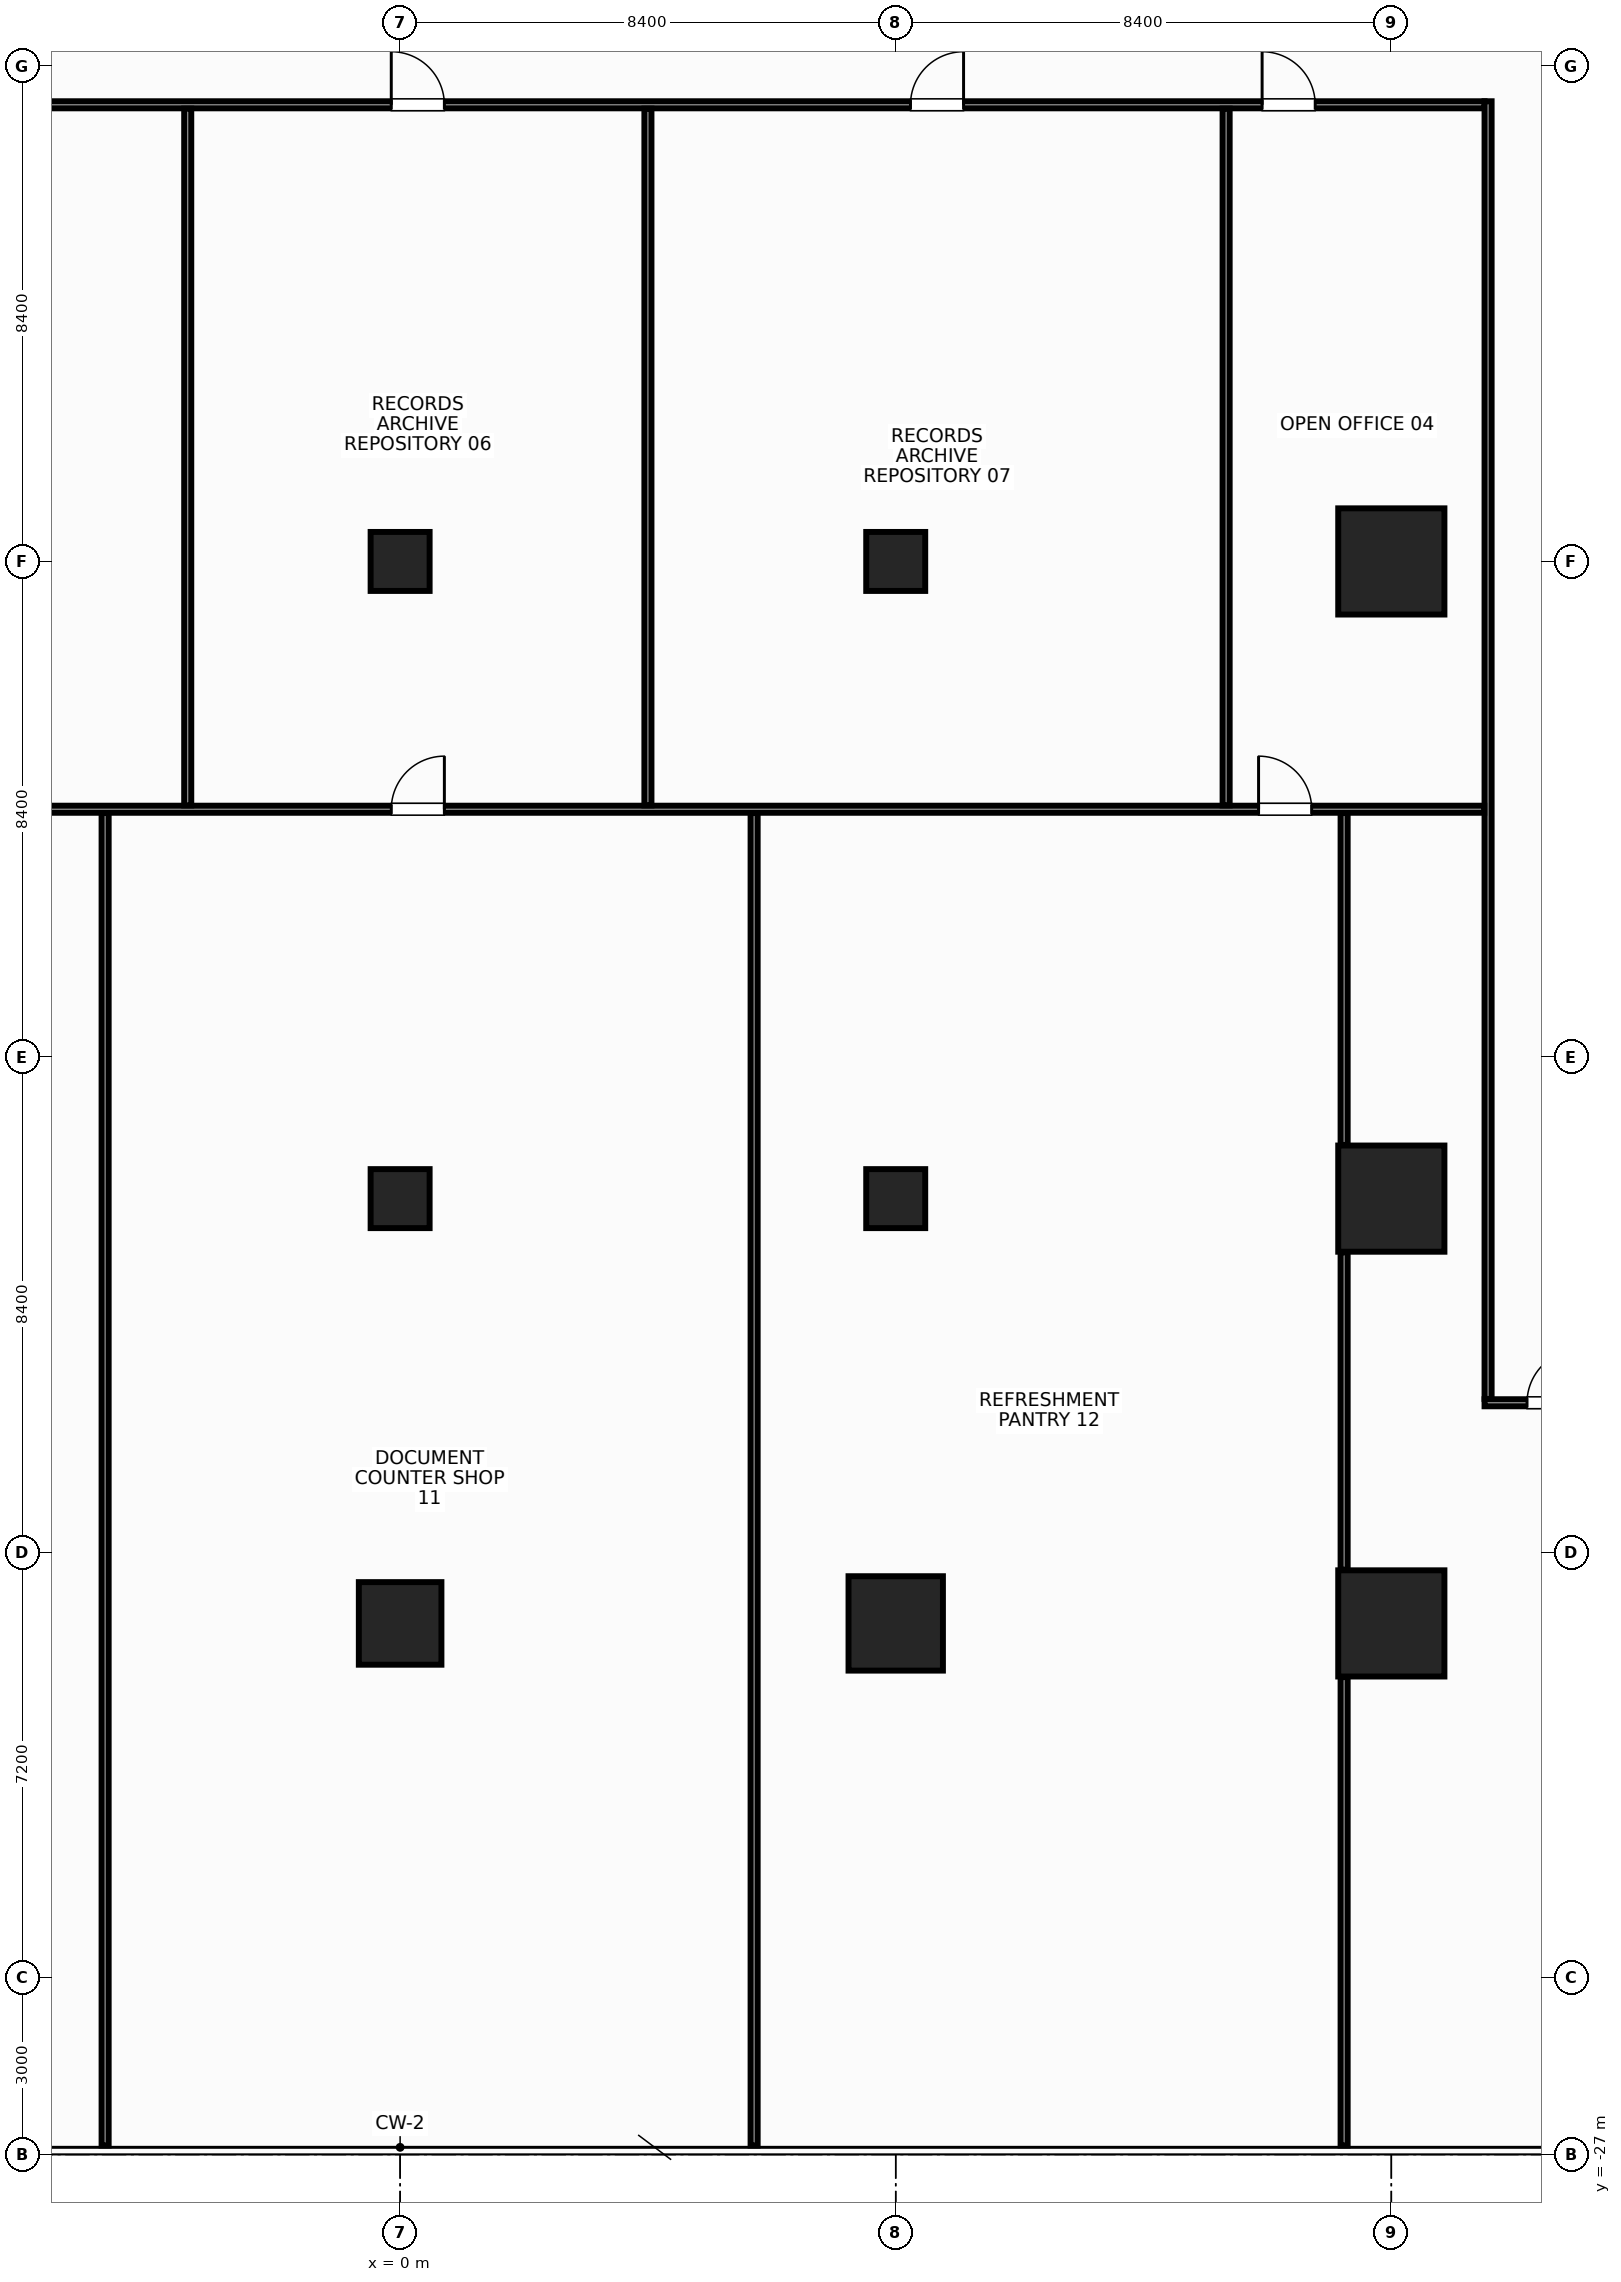
"""IFC4 building model, lengths in metres.
Left out: names, types, materials, properties, quantities, classifications, styles, units other than length and angle.
Written with IfcOpenShell. Run it as: python <this file> out.ifc"""

import sys

from ifc_helpers import new_model, si_unit, direction, frame, frame_2d, origin, origin_2d, place, context, subcontext, project, spatial, rectangle, hollow_rectangle, extrude, source, transform, mapped, element, fill, save


model = new_model("IFC4")
c1 = context("Model", 3, precision=1e-05, world=origin(), true_north=direction((0.0, 1.0)))
c2 = subcontext(c1, "Body", "Model", "MODEL_VIEW")
j1 = project(units=[si_unit("LENGTHUNIT", "METRE"), si_unit("PLANEANGLEUNIT", "RADIAN")], contexts=[c1])
p1 = place(None, origin())
s1 = spatial("IfcSite", under=j1, at=p1, CompositionType="ELEMENT")
p2 = place(p1, origin())
s2 = spatial("IfcBuilding", under=s1, at=p2, CompositionType="ELEMENT")
p3 = place(p2, frame((0.0, 0.0, 23.6)))
s3 = spatial("IfcBuildingStorey", under=s2, at=p3, CompositionType="ELEMENT", Elevation=23.6)
m1 = source(origin(), c2, "Body", "SweptSolid", [
    extrude(rectangle(XDim=1.8, YDim=1.8, at=origin_2d()), origin(), (0.0, 0.0, 1.0), 3.6),
])
for number, where, z_axis, x_axis in (
    (1, (16.8, -18.0, 0.0), (0.0, 0.0, 1.0), (1.0, 0.0, 0.0)),
    (2, (16.8, -10.8, 0.0), (0.0, 0.0, 1.0), (1.0, 0.0, 0.0)),
    (3, (16.8, 0.0, 0.0), (0.0, 0.0, 1.0), (1.0, 0.0, 0.0)),
):
    element("IfcColumn", number, at=place(p3, frame(where, z_axis=z_axis, x_axis=x_axis)), inside=s3, PredefinedType="COLUMN", context=c2, shape_type="MappedRepresentation", body=[
        mapped(m1, transform((0.0, 0.0, 0.0), x_axis=(1.0, 0.0, 0.0), y_axis=(0.0, 1.0, 0.0), z_axis=(0.0, 0.0, 1.0), scale=1.0)),
    ])
m2 = source(origin(), c2, "Body", "SweptSolid", [
    extrude(rectangle(XDim=1.6, YDim=1.6, at=origin_2d()), origin(), (0.0, 0.0, 1.0), 3.6),
])
p4 = place(p3, frame((8.4, -18.0, 0.0), z_axis=(0.0, 0.0, 1.0), x_axis=(1.0, 0.0, 0.0)))
e4 = element("IfcColumn", 4, at=p4, inside=s3, PredefinedType="COLUMN", context=c2, shape_type="MappedRepresentation", body=[
    mapped(m2, transform((0.0, 0.0, 0.0), x_axis=(1.0, 0.0, 0.0), y_axis=(0.0, 1.0, 0.0), z_axis=(0.0, 0.0, 1.0), scale=1.0)),
])
m3 = source(origin(), c2, "Body", "SweptSolid", [
    extrude(hollow_rectangle(XDim=1.0, YDim=1.0, WallThickness=0.045, at=origin_2d()), origin(), (0.0, 0.0, 1.0), 3.6),
])
for number, where, z_axis, x_axis in (
    (5, (8.4, 0.0, 0.0), (0.0, 0.0, 1.0), (1.0, 0.0, 0.0)),
    (6, (8.4, -10.8, 0.0), (0.0, 0.0, 1.0), (1.0, 0.0, 0.0)),
):
    element("IfcColumn", number, at=place(p3, frame(where, z_axis=z_axis, x_axis=x_axis)), inside=s3, PredefinedType="COLUMN", context=c2, shape_type="MappedRepresentation", body=[
        mapped(m3, transform((0.0, 0.0, 0.0), x_axis=(1.0, 0.0, 0.0), y_axis=(0.0, 1.0, 0.0), z_axis=(0.0, 0.0, 1.0), scale=1.0)),
    ])
m4 = source(origin(), c2, "Body", "SweptSolid", [
    extrude(rectangle(XDim=1.4, YDim=1.4, at=origin_2d()), origin(), (0.0, 0.0, 1.0), 3.6),
])
p5 = place(p3, frame((0.0, -18.0, 0.0), z_axis=(0.0, 0.0, 1.0), x_axis=(1.0, 0.0, 0.0)))
e7 = element("IfcColumn", 7, at=p5, inside=s3, PredefinedType="COLUMN", context=c2, shape_type="MappedRepresentation", body=[
    mapped(m4, transform((0.0, 0.0, 0.0), x_axis=(1.0, 0.0, 0.0), y_axis=(0.0, 1.0, 0.0), z_axis=(0.0, 0.0, 1.0), scale=1.0)),
])
m5 = source(origin(), c2, "Body", "SweptSolid", [
    extrude(rectangle(XDim=1.0, YDim=1.0, at=origin_2d()), origin(), (0.0, 0.0, 1.0), 3.6),
])
for number, where, z_axis, x_axis in (
    (8, (0.0, -10.8, 0.0), (0.0, 0.0, 1.0), (1.0, 0.0, 0.0)),
    (9, (0.0, 0.0, 0.0), (0.0, 0.0, 1.0), (1.0, 0.0, 0.0)),
):
    element("IfcColumn", number, at=place(p3, frame(where, z_axis=z_axis, x_axis=x_axis)), inside=s3, PredefinedType="COLUMN", context=c2, shape_type="MappedRepresentation", body=[
        mapped(m5, transform((0.0, 0.0, 0.0), x_axis=(1.0, 0.0, 0.0), y_axis=(0.0, 1.0, 0.0), z_axis=(0.0, 0.0, 1.0), scale=1.0)),
    ])
m6 = source(origin(), c2, "Body", "SweptSolid", [
    extrude(rectangle(XDim=36.76, YDim=0.12, at=frame_2d((18.38, 0.0))), origin(), (0.0, 0.0, 1.0), 2.745),
])
p6 = place(p3, frame((-18.38, 7.74, 0.0), z_axis=(0.0, 0.0, 1.0), x_axis=(1.0, 0.0, 0.0)))
e10 = element("IfcWall", 10, at=p6, inside=s3, PredefinedType="PARTITIONING", context=c2, shape_type="MappedRepresentation", body=[
    mapped(m6, transform((0.0, 0.0, 0.0), x_axis=(1.0, 0.0, 0.0), y_axis=(0.0, 1.0, 0.0), z_axis=(0.0, 0.0, 1.0), scale=1.0)),
])
p7 = place(p6, frame((2.79, 0.0, 0.0)))
e11 = element("IfcOpeningElement", 11, at=p7, cuts=e10, PredefinedType="OPENING", context=c2, shape_type="SweptSolid", body=[
    extrude(rectangle(XDim=0.9, YDim=2.15, at=frame_2d((0.45, 1.075))), frame((0.0, 0.072, 0.0), z_axis=(0.0, -1.0, 0.0), x_axis=(1.0, 0.0, 0.0)), (0.0, 0.0, 1.0), 0.144),
])
p8 = place(p6, frame((32.99, 0.0, 0.0)))
e12 = element("IfcOpeningElement", 12, at=p8, cuts=e10, PredefinedType="OPENING", context=c2, shape_type="SweptSolid", body=[
    extrude(rectangle(XDim=0.9, YDim=2.15, at=frame_2d((0.45, 1.075))), frame((0.0, 0.072, 0.0), z_axis=(0.0, -1.0, 0.0), x_axis=(1.0, 0.0, 0.0)), (0.0, 0.0, 1.0), 0.144),
])
p9 = place(p6, frame((9.93, 0.0, 0.0)))
e13 = element("IfcOpeningElement", 13, at=p9, cuts=e10, PredefinedType="OPENING", context=c2, shape_type="SweptSolid", body=[
    extrude(rectangle(XDim=0.9, YDim=2.15, at=frame_2d((0.45, 1.075))), frame((0.0, 0.072, 0.0), z_axis=(0.0, -1.0, 0.0), x_axis=(1.0, 0.0, 0.0)), (0.0, 0.0, 1.0), 0.144),
])
p10 = place(p6, frame((18.23, 0.0, 0.0)))
e14 = element("IfcOpeningElement", 14, at=p10, cuts=e10, PredefinedType="OPENING", context=c2, shape_type="SweptSolid", body=[
    extrude(rectangle(XDim=0.9, YDim=2.15, at=frame_2d((0.45, 1.075))), frame((0.0, 0.072, 0.0), z_axis=(0.0, -1.0, 0.0), x_axis=(1.0, 0.0, 0.0)), (0.0, 0.0, 1.0), 0.144),
])
p11 = place(p6, frame((27.03, 0.0, 0.0)))
e15 = element("IfcOpeningElement", 15, at=p11, cuts=e10, PredefinedType="OPENING", context=c2, shape_type="SweptSolid", body=[
    extrude(rectangle(XDim=0.9, YDim=2.15, at=frame_2d((0.45, 1.075))), frame((0.0, 0.072, 0.0), z_axis=(0.0, -1.0, 0.0), x_axis=(1.0, 0.0, 0.0)), (0.0, 0.0, 1.0), 0.144),
])
m7 = source(origin(), c2, "Body", "SweptSolid", [
    extrude(rectangle(XDim=2.34, YDim=0.12, at=frame_2d((1.17, 0.0))), origin(), (0.0, 0.0, 1.0), 2.895),
])
p12 = place(p3, frame((18.38, -14.26, 0.0), z_axis=(0.0, 0.0, 1.0), x_axis=(1.0, 0.0, 0.0)))
e16 = element("IfcWall", 16, at=p12, inside=s3, PredefinedType="PARTITIONING", context=c2, shape_type="MappedRepresentation", body=[
    mapped(m7, transform((0.0, 0.0, 0.0), x_axis=(1.0, 0.0, 0.0), y_axis=(0.0, 1.0, 0.0), z_axis=(0.0, 0.0, 1.0), scale=1.0)),
])
p13 = place(p12, frame((0.72, 0.0, 0.0)))
e17 = element("IfcOpeningElement", 17, at=p13, cuts=e16, PredefinedType="OPENING", context=c2, shape_type="SweptSolid", body=[
    extrude(rectangle(XDim=0.9, YDim=2.15, at=frame_2d((0.45, 1.075))), frame((0.0, 0.072, 0.0), z_axis=(0.0, -1.0, 0.0), x_axis=(1.0, 0.0, 0.0)), (0.0, 0.0, 1.0), 0.144),
])
m8 = source(origin(), c2, "Body", "SweptSolid", [
    extrude(rectangle(XDim=21.995, YDim=0.12, at=frame_2d((10.998, 0.0))), origin(), (0.0, 0.0, 1.0), 2.745),
])
p14 = place(p3, frame((18.44, -14.195, 0.0), z_axis=(0.0, 0.0, 1.0), x_axis=(0.0, 1.0, 0.0)))
e18 = element("IfcWall", 18, at=p14, inside=s3, PredefinedType="PARTITIONING", context=c2, shape_type="MappedRepresentation", body=[
    mapped(m8, transform((0.0, 0.0, 0.0), x_axis=(1.0, 0.0, 0.0), y_axis=(0.0, 1.0, 0.0), z_axis=(0.0, 0.0, 1.0), scale=1.0)),
])
m9 = source(origin(), c2, "Body", "SweptSolid", [
    extrude(rectangle(XDim=36.75, YDim=0.12, at=frame_2d((18.375, 0.0))), origin(), (0.0, 0.0, 1.0), 2.745),
])
p15 = place(p3, frame((-18.375, -4.2, 0.0), z_axis=(0.0, 0.0, 1.0), x_axis=(1.0, 0.0, 0.0)))
e19 = element("IfcWall", 19, at=p15, inside=s3, PredefinedType="PARTITIONING", context=c2, shape_type="MappedRepresentation", body=[
    mapped(m9, transform((0.0, 0.0, 0.0), x_axis=(1.0, 0.0, 0.0), y_axis=(0.0, 1.0, 0.0), z_axis=(0.0, 0.0, 1.0), scale=1.0)),
])
p16 = place(p15, frame((3.725, 0.0, 0.0)))
e20 = element("IfcOpeningElement", 20, at=p16, cuts=e19, PredefinedType="OPENING", context=c2, shape_type="SweptSolid", body=[
    extrude(rectangle(XDim=0.9, YDim=2.15, at=frame_2d((0.45, 1.075))), frame((0.0, 0.072, 0.0), z_axis=(0.0, -1.0, 0.0), x_axis=(1.0, 0.0, 0.0)), (0.0, 0.0, 1.0), 0.144),
])
p17 = place(p15, frame((18.225, 0.0, 0.0)))
e21 = element("IfcOpeningElement", 21, at=p17, cuts=e19, PredefinedType="OPENING", context=c2, shape_type="SweptSolid", body=[
    extrude(rectangle(XDim=0.9, YDim=2.15, at=frame_2d((0.45, 1.075))), frame((0.0, 0.072, 0.0), z_axis=(0.0, -1.0, 0.0), x_axis=(1.0, 0.0, 0.0)), (0.0, 0.0, 1.0), 0.144),
])
p18 = place(p15, frame((32.925, 0.0, 0.0)))
e22 = element("IfcOpeningElement", 22, at=p18, cuts=e19, PredefinedType="OPENING", context=c2, shape_type="SweptSolid", body=[
    extrude(rectangle(XDim=0.9, YDim=2.15, at=frame_2d((0.45, 1.075))), frame((0.0, 0.072, 0.0), z_axis=(0.0, -1.0, 0.0), x_axis=(1.0, 0.0, 0.0)), (0.0, 0.0, 1.0), 0.144),
])
m10 = source(origin(), c2, "Body", "SweptSolid", [
    extrude(rectangle(XDim=11.81, YDim=0.12, at=frame_2d((5.905, 0.0))), origin(), (0.0, 0.0, 1.0), 2.301),
])
for number, where, z_axis, x_axis in (
    (23, (-3.6, -4.135, 0.0), (0.0, 0.0, 1.0), (0.0, 1.0, 0.0)),
    (24, (4.2, -4.135, 0.0), (0.0, 0.0, 1.0), (0.0, 1.0, 0.0)),
    (25, (14.0, -4.135, 0.0), (0.0, 0.0, 1.0), (0.0, 1.0, 0.0)),
):
    element("IfcWall", number, at=place(p3, frame(where, z_axis=z_axis, x_axis=x_axis)), inside=s3, PredefinedType="PARTITIONING", context=c2, shape_type="MappedRepresentation", body=[
        mapped(m10, transform((0.0, 0.0, 0.0), x_axis=(1.0, 0.0, 0.0), y_axis=(0.0, 1.0, 0.0), z_axis=(0.0, 0.0, 1.0), scale=1.0)),
    ])
m11 = source(origin(), c2, "Body", "SweptSolid", [
    extrude(rectangle(XDim=22.585, YDim=0.12, at=frame_2d((11.292, 0.0))), origin(), (0.0, 0.0, 1.0), 2.745),
])
for number, where, z_axis, x_axis in (
    (26, (-5.0, -26.85, 0.0), (0.0, 0.0, 1.0), (0.0, 1.0, 0.0)),
    (27, (6.0, -26.85, 0.0), (0.0, 0.0, 1.0), (0.0, 1.0, 0.0)),
):
    element("IfcWall", number, at=place(p3, frame(where, z_axis=z_axis, x_axis=x_axis)), inside=s3, PredefinedType="PARTITIONING", context=c2, shape_type="MappedRepresentation", body=[
        mapped(m11, transform((0.0, 0.0, 0.0), x_axis=(1.0, 0.0, 0.0), y_axis=(0.0, 1.0, 0.0), z_axis=(0.0, 0.0, 1.0), scale=1.0)),
    ])
m12 = source(origin(), c2, "Body", "SweptSolid", [
    extrude(rectangle(XDim=7.94, YDim=0.12, at=frame_2d((3.97, 0.0))), origin(), (0.0, 0.0, 1.0), 3.36),
])
p19 = place(p3, frame((16.0, -26.85, 0.0), z_axis=(0.0, 0.0, 1.0), x_axis=(0.0, 1.0, 0.0)))
e28 = element("IfcWall", 28, at=p19, inside=s3, PredefinedType="PARTITIONING", context=c2, shape_type="MappedRepresentation", body=[
    mapped(m12, transform((0.0, 0.0, 0.0), x_axis=(1.0, 0.0, 0.0), y_axis=(0.0, 1.0, 0.0), z_axis=(0.0, 0.0, 1.0), scale=1.0)),
])
m13 = source(origin(), c2, "Body", "SweptSolid", [
    extrude(rectangle(XDim=5.38, YDim=0.12, at=frame_2d((2.69, 0.0))), origin(), (0.0, 0.0, 1.0), 3.36),
])
p20 = place(p3, frame((16.0, -17.09, 0.0), z_axis=(0.0, 0.0, 1.0), x_axis=(0.0, 1.0, 0.0)))
e29 = element("IfcWall", 29, at=p20, inside=s3, PredefinedType="PARTITIONING", context=c2, shape_type="MappedRepresentation", body=[
    mapped(m13, transform((0.0, 0.0, 0.0), x_axis=(1.0, 0.0, 0.0), y_axis=(0.0, 1.0, 0.0), z_axis=(0.0, 0.0, 1.0), scale=1.0)),
])
m14 = source(origin(), c2, "Body", "SweptSolid", [
    extrude(rectangle(XDim=5.625, YDim=0.12, at=frame_2d((2.812, 0.0))), origin(), (0.0, 0.0, 1.0), 3.36),
])
p21 = place(p3, frame((16.0, -9.89, 0.0), z_axis=(0.0, 0.0, 1.0), x_axis=(0.0, 1.0, 0.0)))
e30 = element("IfcWall", 30, at=p21, inside=s3, PredefinedType="PARTITIONING", context=c2, shape_type="MappedRepresentation", body=[
    mapped(m14, transform((0.0, 0.0, 0.0), x_axis=(1.0, 0.0, 0.0), y_axis=(0.0, 1.0, 0.0), z_axis=(0.0, 0.0, 1.0), scale=1.0)),
])
m15 = source(origin(), c2, "Body", "SweptSolid", [
    extrude(rectangle(XDim=0.9, YDim=2.15, at=frame_2d((0.45, 1.075))), frame((0.0, 0.025, 0.0), z_axis=(0.0, -1.0, 0.0), x_axis=(1.0, 0.0, 0.0)), (0.0, 0.0, 1.0), 0.05),
])
p22 = place(p8, origin())
e31 = element("IfcDoor", 31, at=p22, inside=s3, OperationType="SINGLE_SWING_LEFT", PredefinedType="DOOR", context=c2, shape_type="MappedRepresentation", body=[
    mapped(m15, transform((0.0, 0.0, 0.0), x_axis=(1.0, 0.0, 0.0), y_axis=(0.0, 1.0, 0.0), z_axis=(0.0, 0.0, 1.0), scale=1.0)),
])
fill(e12, e31)
p23 = place(p10, origin())
e32 = element("IfcDoor", 32, at=p23, inside=s3, OperationType="SINGLE_SWING_LEFT", PredefinedType="DOOR", context=c2, shape_type="MappedRepresentation", body=[
    mapped(m15, transform((0.0, 0.0, 0.0), x_axis=(1.0, 0.0, 0.0), y_axis=(0.0, 1.0, 0.0), z_axis=(0.0, 0.0, 1.0), scale=1.0)),
])
fill(e14, e32)
p24 = place(p11, origin())
e33 = element("IfcDoor", 33, at=p24, inside=s3, OperationType="SINGLE_SWING_RIGHT", PredefinedType="DOOR", context=c2, shape_type="MappedRepresentation", body=[
    mapped(m15, transform((0.0, 0.0, 0.0), x_axis=(1.0, 0.0, 0.0), y_axis=(0.0, 1.0, 0.0), z_axis=(0.0, 0.0, 1.0), scale=1.0)),
])
fill(e15, e33)
p25 = place(p13, origin())
e34 = element("IfcDoor", 34, at=p25, inside=s3, OperationType="SINGLE_SWING_RIGHT", PredefinedType="DOOR", context=c2, shape_type="MappedRepresentation", body=[
    mapped(m15, transform((0.0, 0.0, 0.0), x_axis=(1.0, 0.0, 0.0), y_axis=(0.0, 1.0, 0.0), z_axis=(0.0, 0.0, 1.0), scale=1.0)),
])
fill(e17, e34)
p26 = place(p17, origin())
e35 = element("IfcDoor", 35, at=p26, inside=s3, OperationType="SINGLE_SWING_RIGHT", PredefinedType="DOOR", context=c2, shape_type="MappedRepresentation", body=[
    mapped(m15, transform((0.0, 0.0, 0.0), x_axis=(1.0, 0.0, 0.0), y_axis=(0.0, 1.0, 0.0), z_axis=(0.0, 0.0, 1.0), scale=1.0)),
])
fill(e21, e35)
p27 = place(p18, origin())
e36 = element("IfcDoor", 36, at=p27, inside=s3, OperationType="SINGLE_SWING_LEFT", PredefinedType="DOOR", context=c2, shape_type="MappedRepresentation", body=[
    mapped(m15, transform((0.0, 0.0, 0.0), x_axis=(1.0, 0.0, 0.0), y_axis=(0.0, 1.0, 0.0), z_axis=(0.0, 0.0, 1.0), scale=1.0)),
])
fill(e22, e36)
save(model, sys.argv[1])
